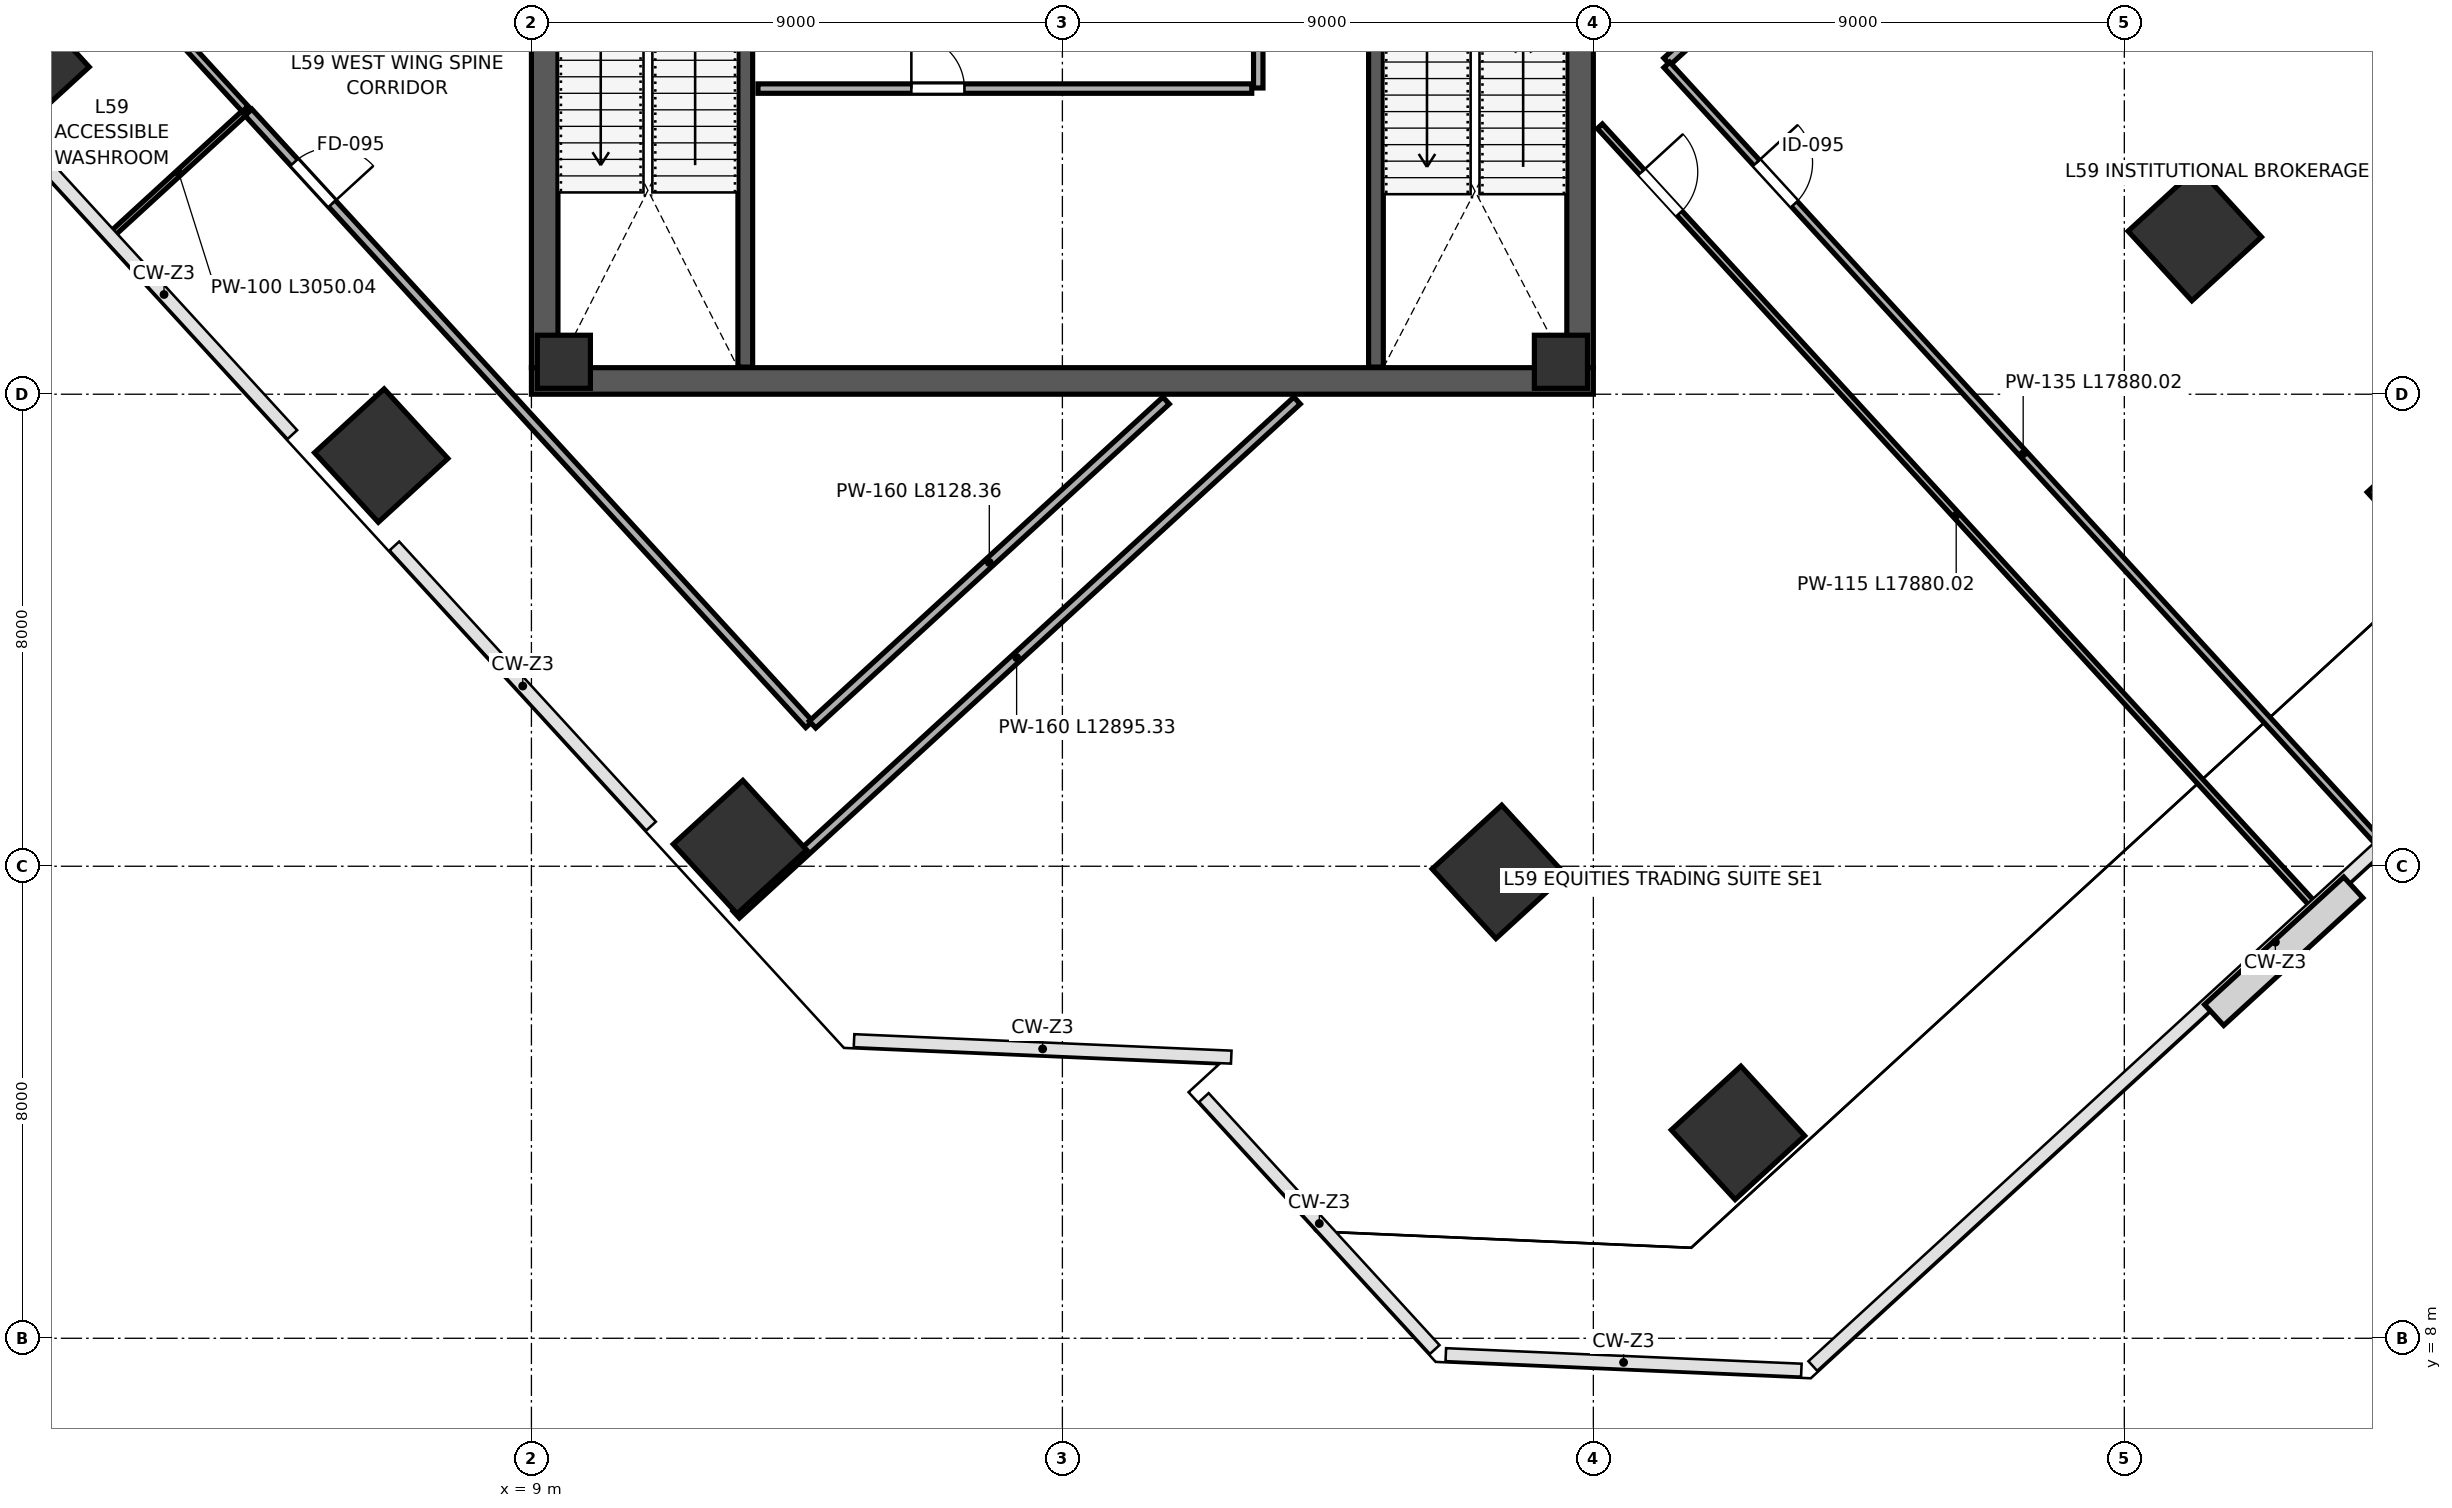
"""IFC4 building model, lengths in metres.
Left out: names, types, materials, properties, quantities, classifications, styles, units other than length and angle.
Written with IfcOpenShell. Run it as: python <this file> out.ifc"""

import sys

from ifc_helpers import new_model, si_unit, direction, frame, frame_2d, origin, origin_2d, place, context, subcontext, project, spatial, rectangle, extrude, source, transform, mapped, element, fill, save


model = new_model("IFC4")
c1 = context("Model", 3, precision=1e-05, world=origin(), true_north=direction((0.0, 1.0)))
c2 = subcontext(c1, "Body", "Model", "MODEL_VIEW")
j1 = project(units=[si_unit("LENGTHUNIT", "METRE"), si_unit("PLANEANGLEUNIT", "RADIAN")], contexts=[c1])
p1 = place(None, origin())
s1 = spatial("IfcSite", under=j1, at=p1, CompositionType="ELEMENT")
p2 = place(p1, origin())
s2 = spatial("IfcBuilding", under=s1, at=p2, CompositionType="ELEMENT")
p3 = place(p2, frame((0.0, 0.0, 262.6)))
s3 = spatial("IfcBuildingStorey", under=s2, at=p3, CompositionType="ELEMENT", Elevation=262.6)
m1 = source(origin(), c2, "Body", "SweptSolid", [
    extrude(rectangle(XDim=0.9, YDim=0.9, at=origin_2d()), origin(), (0.0, 0.0, 1.0), 4.198),
])
for number, where, z_axis, x_axis in (
    (1, (9.55, 24.55, 0.001), (0.0, 0.0, 1.0), (1.0, 0.0, 0.0)),
    (2, (26.45, 24.55, 0.001), (0.0, 0.0, 1.0), (1.0, 0.0, 0.0)),
):
    element("IfcColumn", number, at=place(p3, frame(where, z_axis=z_axis, x_axis=x_axis)), inside=s3, PredefinedType="COLUMN", context=c2, shape_type="MappedRepresentation", body=[
        mapped(m1, transform((0.0, 0.0, 0.0), scale=1.0)),
    ])
m2 = source(origin(), c2, "Body", "SweptSolid", [
    extrude(rectangle(XDim=1.6, YDim=1.6, at=origin_2d()), origin(), (0.0, 0.0, 1.0), 4.198),
])
for number, where, z_axis, x_axis in (
    (3, (0.374, 29.596, 0.001), (0.0, 0.0, 1.0), (-0.676, 0.737, 0.0)),
    (4, (6.454, 22.96, 0.001), (0.0, 0.0, 1.0), (-0.676, 0.737, 0.0)),
    (5, (12.535, 16.325, 0.001), (0.0, 0.0, 1.0), (-0.676, 0.737, 0.0)),
):
    element("IfcColumn", number, at=place(p3, frame(where, z_axis=z_axis, x_axis=x_axis)), inside=s3, PredefinedType="COLUMN", context=c2, shape_type="MappedRepresentation", body=[
        mapped(m2, transform((0.0, 0.0, 0.0), scale=1.0)),
    ])
m3 = source(origin(), c2, "Body", "SweptSolid", [
    extrude(rectangle(XDim=1.6, YDim=1.6, at=origin_2d()), origin(), (0.0, 0.0, 1.0), 4.198),
])
for number, where, z_axis, x_axis in (
    (6, (25.398, 15.905, 0.001), (0.0, 0.0, 1.0), (-0.676, 0.737, 0.0)),
    (7, (37.194, 26.714, 0.001), (0.0, 0.0, 1.0), (-0.676, 0.737, 0.0)),
):
    element("IfcColumn", number, at=place(p3, frame(where, z_axis=z_axis, x_axis=x_axis)), inside=s3, PredefinedType="COLUMN", context=c2, shape_type="MappedRepresentation", body=[
        mapped(m3, transform((0.0, 0.0, 0.0), scale=1.0)),
    ])
for number, where, z_axis, x_axis in (
    (8, (29.451, 11.481, 0.001), (0.0, 0.0, 1.0), (-0.676, 0.737, 0.0)),
    (9, (41.248, 22.291, 0.001), (0.0, 0.0, 1.0), (-0.676, 0.737, 0.0)),
):
    element("IfcColumn", number, at=place(p3, frame(where, z_axis=z_axis, x_axis=x_axis)), inside=s3, PredefinedType="COLUMN", context=c2, shape_type="MappedRepresentation", body=[
        mapped(m2, transform((0.0, 0.0, 0.0), scale=1.0)),
    ])
p4 = place(p3, frame((9.225, 24.45, 0.0), z_axis=(0.0, 0.0, 1.0), x_axis=(0.0, 1.0, 0.0)))
e10 = element("IfcWall", 10, at=p4, inside=s3, PredefinedType="SHEAR", context=c2, shape_type="SweptSolid", body=[
    extrude(rectangle(XDim=15.1, YDim=0.45, at=frame_2d((7.55, 0.0))), origin(), (0.0, 0.0, 1.0), 3.96),
])
p5 = place(p4, frame((8.7, 0.0, 0.0)))
e11 = element("IfcOpeningElement", 11, at=p5, cuts=e10, PredefinedType="OPENING", context=c2, shape_type="SweptSolid", body=[
    extrude(rectangle(XDim=1.15, YDim=2.2, at=frame_2d((0.575, 1.1))), frame((0.0, 0.235, 0.0), z_axis=(0.0, -1.0, 0.0), x_axis=(1.0, 0.0, 0.0)), (0.0, 0.0, 1.0), 0.47),
])
p6 = place(p3, frame((26.775, 24.45, 0.0), z_axis=(0.0, 0.0, 1.0), x_axis=(0.0, 1.0, 0.0)))
e12 = element("IfcWall", 12, at=p6, inside=s3, PredefinedType="SHEAR", context=c2, shape_type="SweptSolid", body=[
    extrude(rectangle(XDim=15.1, YDim=0.45, at=frame_2d((7.55, 0.0))), origin(), (0.0, 0.0, 1.0), 3.96),
])
p7 = place(p6, frame((8.6, 0.0, 0.0)))
e13 = element("IfcOpeningElement", 13, at=p7, cuts=e12, PredefinedType="OPENING", context=c2, shape_type="SweptSolid", body=[
    extrude(rectangle(XDim=1.15, YDim=2.2, at=frame_2d((0.575, 1.1))), frame((0.0, 0.235, 0.0), z_axis=(0.0, -1.0, 0.0), x_axis=(1.0, 0.0, 0.0)), (0.0, 0.0, 1.0), 0.47),
])
p8 = place(p3, frame((9.0, 24.225, 0.0), z_axis=(0.0, 0.0, 1.0), x_axis=(1.0, 0.0, 0.0)))
e14 = element("IfcWall", 14, at=p8, inside=s3, PredefinedType="SHEAR", context=c2, shape_type="SweptSolid", body=[
    extrude(rectangle(XDim=18.0, YDim=0.45, at=frame_2d((9.0, 0.0))), origin(), (0.0, 0.0, 1.0), 3.96),
])
p9 = place(p3, frame((12.625, 24.46, 0.0), z_axis=(0.0, 0.0, 1.0), x_axis=(0.0, 1.0, 0.0)))
e15 = element("IfcWall", 15, at=p9, inside=s3, PredefinedType="SHEAR", context=c2, shape_type="SweptSolid", body=[
    extrude(rectangle(XDim=7.49, YDim=0.25, at=frame_2d((3.745, 0.0))), origin(), (0.0, 0.0, 1.0), 3.96),
])
p10 = place(p9, frame((5.85, 0.0, 0.0)))
e16 = element("IfcOpeningElement", 16, at=p10, cuts=e15, PredefinedType="OPENING", context=c2, shape_type="SweptSolid", body=[
    extrude(rectangle(XDim=1.15, YDim=2.2, at=frame_2d((0.575, 1.1))), frame((0.0, 0.135, 0.0), z_axis=(0.0, -1.0, 0.0), x_axis=(1.0, 0.0, 0.0)), (0.0, 0.0, 1.0), 0.27),
])
p11 = place(p3, frame((23.315, 24.46, 0.0), z_axis=(0.0, 0.0, 1.0), x_axis=(0.0, 1.0, 0.0)))
e17 = element("IfcWall", 17, at=p11, inside=s3, PredefinedType="SHEAR", context=c2, shape_type="SweptSolid", body=[
    extrude(rectangle(XDim=7.49, YDim=0.25, at=frame_2d((3.745, 0.0))), origin(), (0.0, 0.0, 1.0), 3.96),
])
p12 = place(p3, frame((12.84, 29.18, 0.0), z_axis=(0.0, 0.0, 1.0), x_axis=(1.0, 0.0, 0.0)))
e18 = element("IfcWall", 18, at=p12, inside=s3, PredefinedType="PARTITIONING", context=c2, shape_type="SweptSolid", body=[
    extrude(rectangle(XDim=8.37, YDim=0.16, at=frame_2d((4.185, 0.0))), origin(), (0.0, 0.0, 1.0), 3.96),
])
p13 = place(p12, frame((2.6, 0.0, 0.0)))
e19 = element("IfcOpeningElement", 19, at=p13, cuts=e18, PredefinedType="OPENING", context=c2, shape_type="SweptSolid", body=[
    extrude(rectangle(XDim=0.9, YDim=2.15, at=frame_2d((0.45, 1.075))), frame((0.0, 0.09, 0.0), z_axis=(0.0, -1.0, 0.0), x_axis=(1.0, 0.0, 0.0)), (0.0, 0.0, 1.0), 0.18),
])
p14 = place(p3, frame((21.32, 29.19, 0.0), z_axis=(0.0, 0.0, 1.0), x_axis=(0.0, 1.0, 0.0)))
e20 = element("IfcWall", 20, at=p14, inside=s3, PredefinedType="PARTITIONING", context=c2, shape_type="SweptSolid", body=[
    extrude(rectangle(XDim=2.92, YDim=0.16, at=frame_2d((1.46, 0.0))), origin(), (0.0, 0.0, 1.0), 3.96),
])
p15 = place(p3, frame((-0.231, 29.042, 0.0), z_axis=(0.0, 0.0, 1.0), x_axis=(0.737290351983, 0.675576003772, 0.0)))
e21 = element("IfcWall", 21, at=p15, inside=s3, PredefinedType="PARTITIONING", context=c2, shape_type="SweptSolid", body=[
    extrude(rectangle(XDim=3.05, YDim=0.115, at=frame_2d((1.525, 0.0))), origin(), (0.0, 0.0, 1.0), 3.295),
])
p16 = place(p3, frame((1.897, 26.719, 0.0), z_axis=(0.0, 0.0, 1.0), x_axis=(0.737290351983, 0.675576003772, 0.0)))
e22 = element("IfcWall", 22, at=p16, inside=s3, PredefinedType="PARTITIONING", context=c2, shape_type="SweptSolid", body=[
    extrude(rectangle(XDim=3.05, YDim=0.1, at=frame_2d((1.525, 0.0))), origin(), (0.0, 0.0, 1.0), 3.295),
])
p17 = place(p3, frame((-0.474, 33.881, 0.0), z_axis=(0.0, 0.0, 1.0), x_axis=(0.675605050901, -0.73726373517, 0.0)))
e23 = element("IfcWall", 23, at=p17, inside=s3, PredefinedType="PARTITIONING", context=c2, shape_type="SweptSolid", body=[
    extrude(rectangle(XDim=6.842, YDim=0.135, at=frame_2d((3.421, 0.0))), origin(), (0.0, 0.0, 1.0), 3.96),
])
p18 = place(p17, frame((2.32, 0.0, 0.0)))
e24 = element("IfcOpeningElement", 24, at=p18, cuts=e23, PredefinedType="OPENING", context=c2, shape_type="SweptSolid", body=[
    extrude(rectangle(XDim=0.9, YDim=2.15, at=frame_2d((0.45, 1.075))), frame((0.0, 0.078, 0.0), z_axis=(0.0, -1.0, 0.0), x_axis=(1.0, 0.0, 0.0)), (0.0, 0.0, 1.0), 0.155),
])
p19 = place(p17, frame((4.42, 0.0, 0.0)))
e25 = element("IfcOpeningElement", 25, at=p19, cuts=e23, PredefinedType="OPENING", context=c2, shape_type="SweptSolid", body=[
    extrude(rectangle(XDim=0.95, YDim=2.15, at=frame_2d((0.475, 1.075))), frame((0.0, 0.078, 0.0), z_axis=(0.0, -1.0, 0.0), x_axis=(1.0, 0.0, 0.0)), (0.0, 0.0, 1.0), 0.155),
])
p20 = place(p3, frame((4.203, 28.778, 0.0), z_axis=(0.0, 0.0, 1.0), x_axis=(0.675591041558, -0.737276572642, 0.0)))
e26 = element("IfcWall", 26, at=p20, inside=s3, PredefinedType="PARTITIONING", context=c2, shape_type="SweptSolid", body=[
    extrude(rectangle(XDim=14.07, YDim=0.16, at=frame_2d((7.035, 0.0))), origin(), (0.0, 0.0, 1.0), 3.96),
])
p21 = place(p20, frame((1.15, 0.0, 0.0)))
e27 = element("IfcOpeningElement", 27, at=p21, cuts=e26, PredefinedType="OPENING", context=c2, shape_type="SweptSolid", body=[
    extrude(rectangle(XDim=0.95, YDim=2.15, at=frame_2d((0.475, 1.075))), frame((0.0, 0.09, 0.0), z_axis=(0.0, -1.0, 0.0), x_axis=(1.0, 0.0, 0.0)), (0.0, 0.0, 1.0), 0.18),
])
p22 = place(p3, frame((13.765, 18.402, 0.0), z_axis=(0.0, 0.0, 1.0), x_axis=(0.737266340408, 0.675602207887, 0.0)))
e28 = element("IfcWall", 28, at=p22, inside=s3, PredefinedType="PARTITIONING", context=c2, shape_type="SweptSolid", body=[
    extrude(rectangle(XDim=8.128, YDim=0.16, at=frame_2d((4.064, 0.0))), origin(), (0.0, 0.0, 1.0), 3.96),
])
p23 = place(p3, frame((28.248, 29.639, 0.0), z_axis=(0.0, 0.0, 1.0), x_axis=(0.73728000412, 0.675587296746, 0.0)))
e29 = element("IfcWall", 29, at=p23, inside=s3, PredefinedType="PARTITIONING", context=c2, shape_type="SweptSolid", body=[
    extrude(rectangle(XDim=12.64, YDim=0.16, at=frame_2d((6.32, 0.0))), origin(), (0.0, 0.0, 1.0), 3.295),
])
p24 = place(p3, frame((12.47, 15.181, 0.0), z_axis=(0.0, 0.0, 1.0), x_axis=(0.737265724175, 0.675602880365, 0.0)))
e30 = element("IfcWall", 30, at=p24, inside=s3, PredefinedType="PARTITIONING", context=c2, shape_type="SweptSolid", body=[
    extrude(rectangle(XDim=12.895, YDim=0.16, at=frame_2d((6.448, 0.0))), origin(), (0.0, 0.0, 1.0), 3.96),
])
p25 = place(p3, frame((28.246, 29.582, 0.0), z_axis=(0.0, 0.0, 1.0), x_axis=(0.67559539026, -0.737272587758, 0.0)))
e31 = element("IfcWall", 31, at=p25, inside=s3, PredefinedType="PARTITIONING", context=c2, shape_type="SweptSolid", body=[
    extrude(rectangle(XDim=17.88, YDim=0.135, at=frame_2d((8.94, 0.0))), origin(), (0.0, 0.0, 1.0), 3.96),
])
p26 = place(p25, frame((2.25, 0.0, 0.0)))
e32 = element("IfcOpeningElement", 32, at=p26, cuts=e31, PredefinedType="OPENING", context=c2, shape_type="SweptSolid", body=[
    extrude(rectangle(XDim=0.95, YDim=2.15, at=frame_2d((0.475, 1.075))), frame((0.0, 0.078, 0.0), z_axis=(0.0, -1.0, 0.0), x_axis=(1.0, 0.0, 0.0)), (0.0, 0.0, 1.0), 0.155),
])
p27 = place(p3, frame((27.11, 28.542, 0.0), z_axis=(0.0, 0.0, 1.0), x_axis=(0.675588589041, -0.737278819957, 0.0)))
e33 = element("IfcWall", 33, at=p27, inside=s3, PredefinedType="PARTITIONING", context=c2, shape_type="SweptSolid", body=[
    extrude(rectangle(XDim=17.88, YDim=0.115, at=frame_2d((8.94, 0.0))), origin(), (0.0, 0.0, 1.0), 3.96),
])
p28 = place(p27, frame((1.05, 0.0, 0.0)))
e34 = element("IfcOpeningElement", 34, at=p28, cuts=e33, PredefinedType="OPENING", context=c2, shape_type="SweptSolid", body=[
    extrude(rectangle(XDim=0.95, YDim=2.15, at=frame_2d((0.475, 1.075))), frame((0.0, 0.067, 0.0), z_axis=(0.0, -1.0, 0.0), x_axis=(1.0, 0.0, 0.0)), (0.0, 0.0, 1.0), 0.135),
])
m4 = source(origin(), c2, "Body", "SweptSolid", [
    extrude(rectangle(XDim=0.9, YDim=2.15, at=frame_2d((0.45, 1.075))), frame((0.0, 0.025, 0.0), z_axis=(0.0, -1.0, 0.0), x_axis=(1.0, 0.0, 0.0)), (0.0, 0.0, 1.0), 0.05),
])
p29 = place(p13, origin())
e35 = element("IfcDoor", 35, at=p29, inside=s3, OperationType="SINGLE_SWING_LEFT", PredefinedType="DOOR", context=c2, shape_type="MappedRepresentation", body=[
    mapped(m4, transform((0.0, 0.0, 0.0), scale=1.0)),
])
fill(e19, e35)
m5 = source(origin(), c2, "Body", "SweptSolid", [
    extrude(rectangle(XDim=0.95, YDim=2.15, at=frame_2d((0.475, 1.075))), frame((0.0, 0.025, 0.0), z_axis=(0.0, -1.0, 0.0), x_axis=(1.0, 0.0, 0.0)), (0.0, 0.0, 1.0), 0.05),
])
p30 = place(p21, origin())
e36 = element("IfcDoor", 36, at=p30, inside=s3, OperationType="SINGLE_SWING_RIGHT", PredefinedType="DOOR", context=c2, shape_type="MappedRepresentation", body=[
    mapped(m5, transform((0.0, 0.0, 0.0), scale=1.0)),
])
fill(e27, e36)
m6 = source(origin(), c2, "Body", "SweptSolid", [
    extrude(rectangle(XDim=0.95, YDim=2.15, at=frame_2d((0.475, 1.075))), frame((0.0, 0.025, 0.0), z_axis=(0.0, -1.0, 0.0), x_axis=(1.0, 0.0, 0.0)), (0.0, 0.0, 1.0), 0.05),
])
p31 = place(p26, origin())
e37 = element("IfcDoor", 37, at=p31, inside=s3, OperationType="SINGLE_SWING_LEFT", PredefinedType="DOOR", context=c2, shape_type="MappedRepresentation", body=[
    mapped(m6, transform((0.0, 0.0, 0.0), scale=1.0)),
])
fill(e32, e37)
p32 = place(p28, origin())
e38 = element("IfcDoor", 38, at=p32, inside=s3, OperationType="SINGLE_SWING_LEFT", PredefinedType="DOOR", context=c2, shape_type="MappedRepresentation", body=[
    mapped(m6, transform((0.0, 0.0, 0.0), scale=1.0)),
])
fill(e34, e38)
save(model, sys.argv[1])
